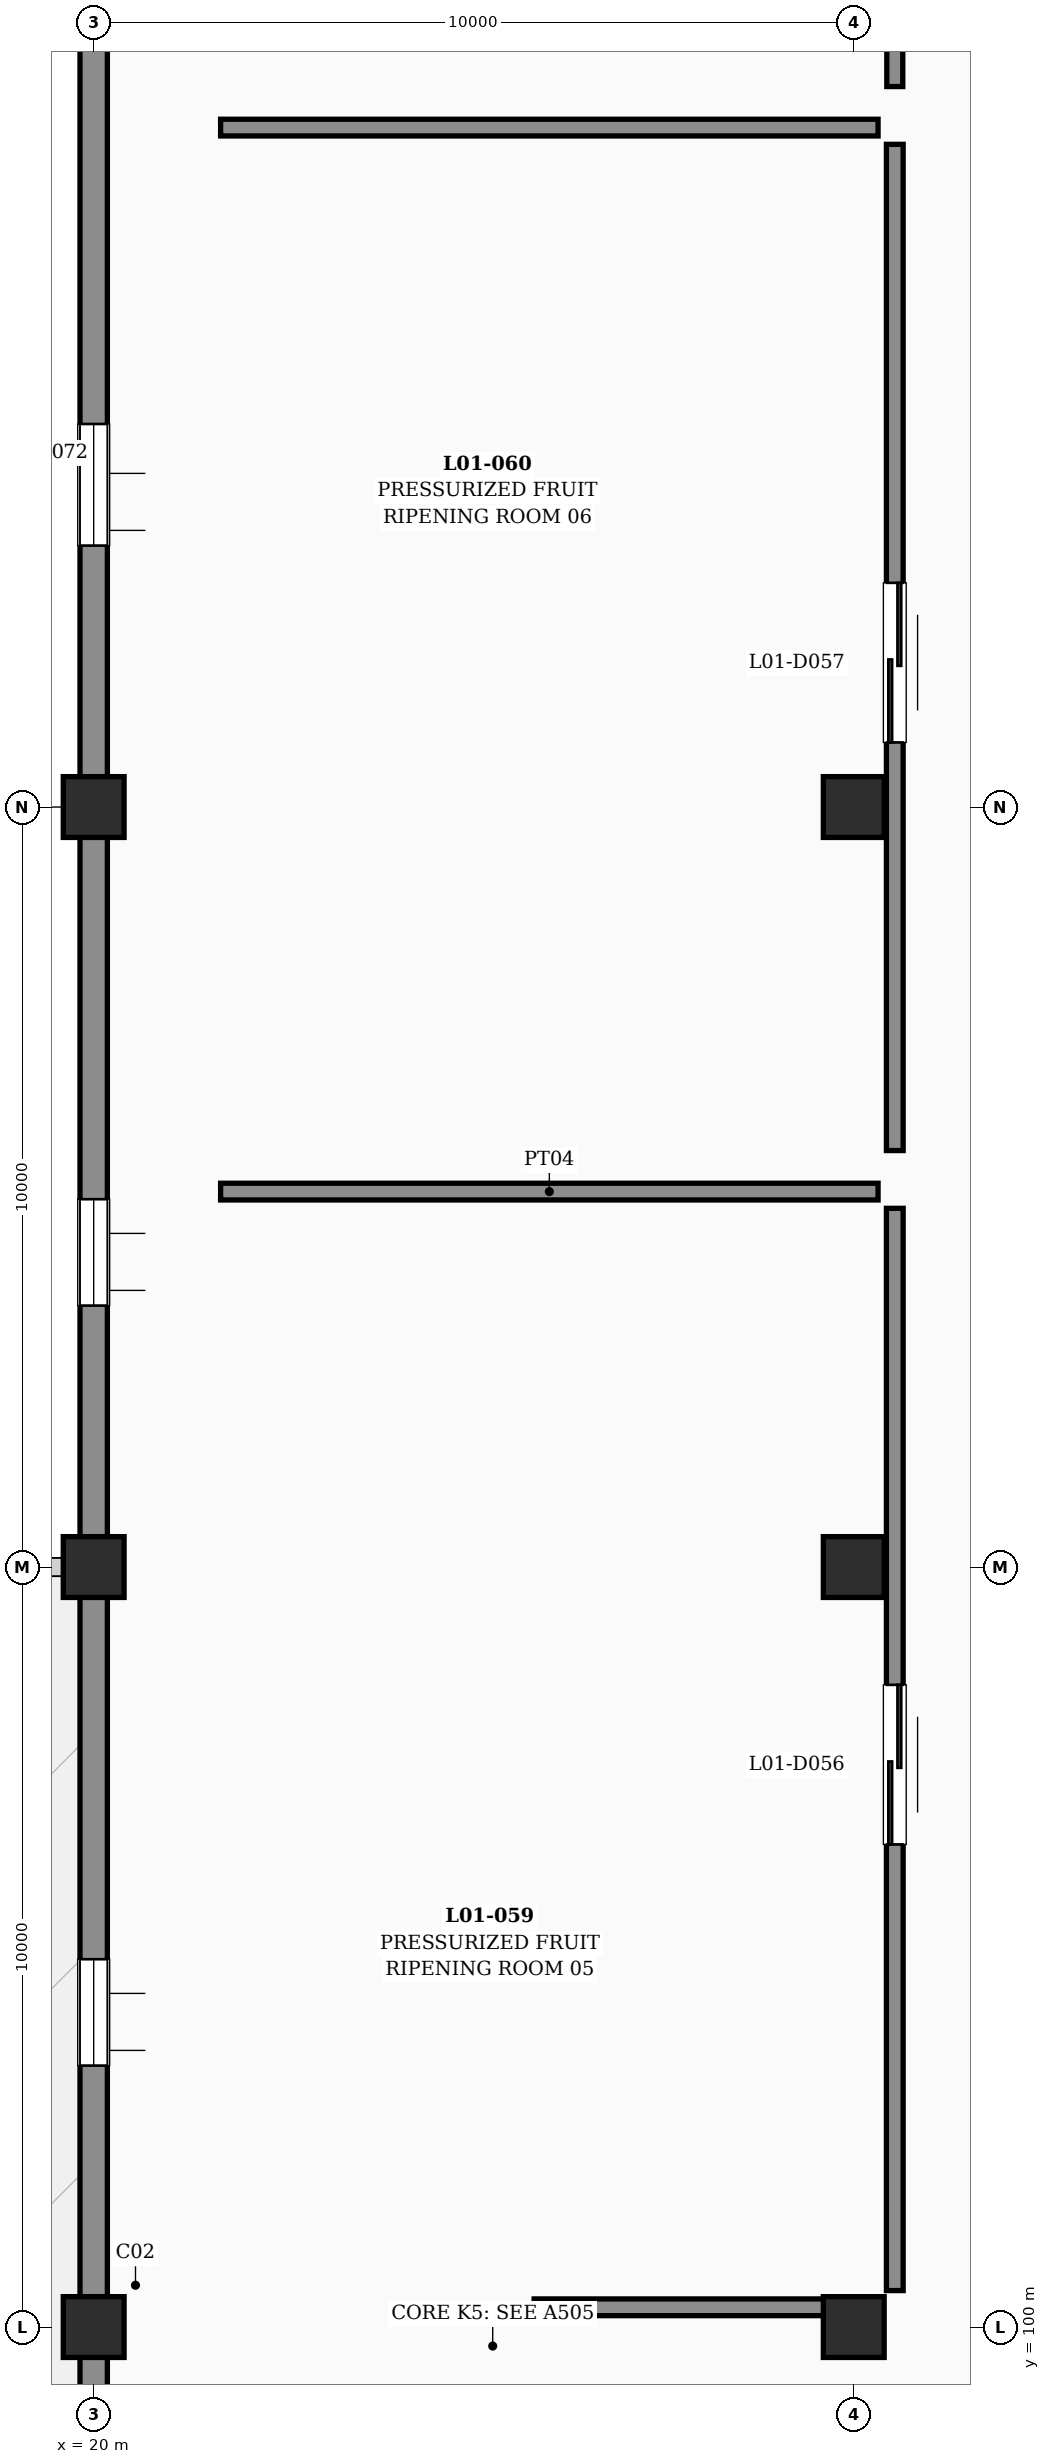
"""IFC4 building model, lengths in metres.
Left out: names, types, materials, properties, quantities, classifications, styles, units other than length and angle.
Written with IfcOpenShell. Run it as: python <this file> out.ifc"""

import sys

from ifc_helpers import new_model, si_unit, direction, frame, frame_2d, origin, origin_2d, place, context, subcontext, project, spatial, rectangle, extrude, element, fill, save


model = new_model("IFC4")
c1 = context("Model", 3, precision=1e-05, world=origin(), true_north=direction((0.0, 1.0)))
c2 = subcontext(c1, "Body", "Model", "MODEL_VIEW")
j1 = project(units=[si_unit("LENGTHUNIT", "METRE"), si_unit("PLANEANGLEUNIT", "RADIAN")], contexts=[c1])
p1 = place(None, origin())
s1 = spatial("IfcSite", under=j1, at=p1, CompositionType="ELEMENT")
p2 = place(p1, origin())
s2 = spatial("IfcBuilding", under=s1, at=p2, CompositionType="ELEMENT")
p3 = place(p2, frame((0.0, 0.0, 6.0)))
s3 = spatial("IfcBuildingStorey", under=s2, at=p3, CompositionType="ELEMENT", Elevation=6.0)
for number, where, z_axis, x_axis in (
    (1, (20.0, 100.0, 0.0), (0.0, 0.0, 1.0), (1.0, 0.0, 0.0)),
    (2, (20.0, 110.0, 0.0), (0.0, 0.0, 1.0), (1.0, 0.0, 0.0)),
    (3, (20.0, 120.0, 0.0), (0.0, 0.0, 1.0), (1.0, 0.0, 0.0)),
    (4, (30.0, 100.0, 0.0), (0.0, 0.0, 1.0), (1.0, 0.0, 0.0)),
    (5, (30.0, 110.0, 0.0), (0.0, 0.0, 1.0), (1.0, 0.0, 0.0)),
    (6, (30.0, 120.0, 0.0), (0.0, 0.0, 1.0), (1.0, 0.0, 0.0)),
):
    element("IfcColumn", number, at=place(p3, frame(where, z_axis=z_axis, x_axis=x_axis)), inside=s3, PredefinedType="COLUMN", context=c2, shape_type="SweptSolid", body=[
        extrude(rectangle(XDim=0.8, YDim=0.8, at=origin_2d()), origin(), (0.0, 0.0, 1.0), 4.8),
    ])
p4 = place(p3, frame((10.24, 110.0, 0.0), z_axis=(0.0, 0.0, 1.0), x_axis=(1.0, 0.0, 0.0)))
e7 = element("IfcWall", 7, at=p4, inside=s3, PredefinedType="PARAPET", context=c2, shape_type="SweptSolid", body=[
    extrude(rectangle(XDim=9.52, YDim=0.24, at=frame_2d((4.76, 0.0))), origin(), (0.0, 0.0, 1.0), 1.1),
])
p5 = place(p3, frame((20.0, 90.24, 0.0), z_axis=(0.0, 0.0, 1.0), x_axis=(0.0, 1.0, 0.0)))
e8 = element("IfcWall", 8, at=p5, inside=s3, PredefinedType="SOLIDWALL", context=c2, shape_type="SweptSolid", body=[
    extrude(rectangle(XDim=9.52, YDim=0.36, at=frame_2d((4.76, 0.0))), origin(), (0.0, 0.0, 1.0), 3.61),
])
p6 = place(p5, frame((3.2, 0.0, 1.2)))
e9 = element("IfcOpeningElement", 9, at=p6, cuts=e8, PredefinedType="OPENING", context=c2, shape_type="SweptSolid", body=[
    extrude(rectangle(XDim=1.4, YDim=1.35, at=frame_2d((0.7, 0.675))), frame((0.0, 0.19, 0.0), z_axis=(0.0, -1.0, 0.0), x_axis=(1.0, 0.0, 0.0)), (0.0, 0.0, 1.0), 0.38),
])
p7 = place(p3, frame((20.0, 100.24, 0.0), z_axis=(0.0, 0.0, 1.0), x_axis=(0.0, 1.0, 0.0)))
e10 = element("IfcWall", 10, at=p7, inside=s3, PredefinedType="SOLIDWALL", context=c2, shape_type="SweptSolid", body=[
    extrude(rectangle(XDim=9.52, YDim=0.36, at=frame_2d((4.76, 0.0))), origin(), (0.0, 0.0, 1.0), 3.61),
])
p8 = place(p7, frame((3.2, 0.0, 1.2)))
e11 = element("IfcOpeningElement", 11, at=p8, cuts=e10, PredefinedType="OPENING", context=c2, shape_type="SweptSolid", body=[
    extrude(rectangle(XDim=1.4, YDim=1.35, at=frame_2d((0.7, 0.675))), frame((0.0, 0.19, 0.0), z_axis=(0.0, -1.0, 0.0), x_axis=(1.0, 0.0, 0.0)), (0.0, 0.0, 1.0), 0.38),
])
p9 = place(p3, frame((20.0, 110.24, 0.0), z_axis=(0.0, 0.0, 1.0), x_axis=(0.0, 1.0, 0.0)))
e12 = element("IfcWall", 12, at=p9, inside=s3, PredefinedType="SOLIDWALL", context=c2, shape_type="SweptSolid", body=[
    extrude(rectangle(XDim=9.52, YDim=0.36, at=frame_2d((4.76, 0.0))), origin(), (0.0, 0.0, 1.0), 3.61),
])
p10 = place(p9, frame((3.2, 0.0, 1.2)))
e13 = element("IfcOpeningElement", 13, at=p10, cuts=e12, PredefinedType="OPENING", context=c2, shape_type="SweptSolid", body=[
    extrude(rectangle(XDim=1.4, YDim=1.35, at=frame_2d((0.7, 0.675))), frame((0.0, 0.19, 0.0), z_axis=(0.0, -1.0, 0.0), x_axis=(1.0, 0.0, 0.0)), (0.0, 0.0, 1.0), 0.38),
])
p11 = place(p3, frame((20.0, 120.24, 0.0), z_axis=(0.0, 0.0, 1.0), x_axis=(0.0, 1.0, 0.0)))
e14 = element("IfcWall", 14, at=p11, inside=s3, PredefinedType="SOLIDWALL", context=c2, shape_type="SweptSolid", body=[
    extrude(rectangle(XDim=11.52, YDim=0.36, at=frame_2d((5.76, 0.0))), origin(), (0.0, 0.0, 1.0), 3.61),
])
p12 = place(p11, frame((3.2, 0.0, 1.2)))
e15 = element("IfcOpeningElement", 15, at=p12, cuts=e14, PredefinedType="OPENING", context=c2, shape_type="SweptSolid", body=[
    extrude(rectangle(XDim=1.6, YDim=1.5, at=frame_2d((0.8, 0.75))), frame((0.0, 0.19, 0.0), z_axis=(0.0, -1.0, 0.0), x_axis=(1.0, 0.0, 0.0)), (0.0, 0.0, 1.0), 0.38),
])
p13 = place(p3, frame((21.67, 114.94, 0.0), z_axis=(0.0, 0.0, 1.0), x_axis=(1.0, 0.0, 0.0)))
e16 = element("IfcWall", 16, at=p13, inside=s3, PredefinedType="PARTITIONING", context=c2, shape_type="SweptSolid", body=[
    extrude(rectangle(XDim=8.65, YDim=0.22, at=frame_2d((4.325, 0.0))), origin(), (0.0, 0.0, 1.0), 3.51),
])
p14 = place(p3, frame((30.54, 114.72, 0.0), z_axis=(0.0, 0.0, 1.0), x_axis=(0.0, -1.0, 0.0)))
e17 = element("IfcWall", 17, at=p14, inside=s3, PredefinedType="PARTITIONING", context=c2, shape_type="SweptSolid", body=[
    extrude(rectangle(XDim=14.24, YDim=0.22, at=frame_2d((7.12, 0.0))), origin(), (0.0, 0.0, 1.0), 3.51),
])
p15 = place(p14, frame((6.27, 0.0, 0.0)))
e18 = element("IfcOpeningElement", 18, at=p15, cuts=e17, PredefinedType="OPENING", context=c2, shape_type="SweptSolid", body=[
    extrude(rectangle(XDim=2.1, YDim=2.4, at=frame_2d((1.05, 1.2))), frame((0.0, 0.12, 0.0), z_axis=(0.0, -1.0, 0.0), x_axis=(1.0, 0.0, 0.0)), (0.0, 0.0, 1.0), 0.24),
])
p16 = place(p3, frame((30.32, 100.26, 0.0), z_axis=(0.0, 0.0, 1.0), x_axis=(-1.0, 0.0, 0.0)))
e19 = element("IfcWall", 19, at=p16, inside=s3, PredefinedType="PARTITIONING", context=c2, shape_type="SweptSolid", body=[
    extrude(rectangle(XDim=4.525, YDim=0.22, at=frame_2d((2.263, 0.0))), origin(), (0.0, 0.0, 1.0), 3.51),
])
p17 = place(p3, frame((21.67, 128.94, 0.0), z_axis=(0.0, 0.0, 1.0), x_axis=(1.0, 0.0, 0.0)))
e20 = element("IfcWall", 20, at=p17, inside=s3, PredefinedType="PARTITIONING", context=c2, shape_type="SweptSolid", body=[
    extrude(rectangle(XDim=8.65, YDim=0.22, at=frame_2d((4.325, 0.0))), origin(), (0.0, 0.0, 1.0), 3.51),
])
p18 = place(p3, frame((30.54, 128.72, 0.0), z_axis=(0.0, 0.0, 1.0), x_axis=(0.0, -1.0, 0.0)))
e21 = element("IfcWall", 21, at=p18, inside=s3, PredefinedType="PARTITIONING", context=c2, shape_type="SweptSolid", body=[
    extrude(rectangle(XDim=13.24, YDim=0.22, at=frame_2d((6.62, 0.0))), origin(), (0.0, 0.0, 1.0), 3.51),
])
p19 = place(p18, frame((5.77, 0.0, 0.0)))
e22 = element("IfcOpeningElement", 22, at=p19, cuts=e21, PredefinedType="OPENING", context=c2, shape_type="SweptSolid", body=[
    extrude(rectangle(XDim=2.1, YDim=2.4, at=frame_2d((1.05, 1.2))), frame((0.0, 0.12, 0.0), z_axis=(0.0, -1.0, 0.0), x_axis=(1.0, 0.0, 0.0)), (0.0, 0.0, 1.0), 0.24),
])
p20 = place(p3, frame((30.54, 140.33, 0.0), z_axis=(0.0, 0.0, 1.0), x_axis=(0.0, -1.0, 0.0)))
e23 = element("IfcWall", 23, at=p20, inside=s3, PredefinedType="PARTITIONING", context=c2, shape_type="SweptSolid", body=[
    extrude(rectangle(XDim=10.85, YDim=0.21, at=frame_2d((5.425, 0.0))), origin(), (0.0, 0.0, 1.0), 3.51),
])
p21 = place(p20, frame((4.575, 0.0, 0.0)))
e24 = element("IfcOpeningElement", 24, at=p21, cuts=e23, PredefinedType="OPENING", context=c2, shape_type="SweptSolid", body=[
    extrude(rectangle(XDim=1.65, YDim=2.25, at=frame_2d((0.825, 1.125))), frame((0.0, 0.115, 0.0), z_axis=(0.0, -1.0, 0.0), x_axis=(1.0, 0.0, 0.0)), (0.0, 0.0, 1.0), 0.23),
])
p22 = place(p8, origin())
e25 = element("IfcWindow", 25, at=p22, inside=s3, PartitioningType="SINGLE_PANEL", PredefinedType="WINDOW", context=c2, shape_type="SweptSolid", body=[
    extrude(rectangle(XDim=1.4, YDim=1.35, at=frame_2d((0.7, 0.675))), frame((0.0, 0.03, 0.0), z_axis=(0.0, -1.0, 0.0), x_axis=(1.0, 0.0, 0.0)), (0.0, 0.0, 1.0), 0.06),
])
fill(e11, e25)
p23 = place(p10, origin())
e26 = element("IfcWindow", 26, at=p23, inside=s3, PartitioningType="SINGLE_PANEL", PredefinedType="WINDOW", context=c2, shape_type="SweptSolid", body=[
    extrude(rectangle(XDim=1.4, YDim=1.35, at=frame_2d((0.7, 0.675))), frame((0.0, 0.03, 0.0), z_axis=(0.0, -1.0, 0.0), x_axis=(1.0, 0.0, 0.0)), (0.0, 0.0, 1.0), 0.06),
])
fill(e13, e26)
p24 = place(p12, origin())
e27 = element("IfcWindow", 27, at=p24, inside=s3, PartitioningType="SINGLE_PANEL", PredefinedType="WINDOW", context=c2, shape_type="SweptSolid", body=[
    extrude(rectangle(XDim=1.6, YDim=1.5, at=frame_2d((0.8, 0.75))), frame((0.0, 0.03, 0.0), z_axis=(0.0, -1.0, 0.0), x_axis=(1.0, 0.0, 0.0)), (0.0, 0.0, 1.0), 0.06),
])
fill(e15, e27)
p25 = place(p15, origin())
e28 = element("IfcDoor", 28, at=p25, inside=s3, OperationType="DOUBLE_DOOR_SLIDING", PredefinedType="DOOR", context=c2, shape_type="SweptSolid", body=[
    extrude(rectangle(XDim=2.1, YDim=2.4, at=frame_2d((1.05, 1.2))), frame((0.0, 0.025, 0.0), z_axis=(0.0, -1.0, 0.0), x_axis=(1.0, 0.0, 0.0)), (0.0, 0.0, 1.0), 0.05),
])
fill(e18, e28)
p26 = place(p19, origin())
e29 = element("IfcDoor", 29, at=p26, inside=s3, OperationType="DOUBLE_DOOR_SLIDING", PredefinedType="DOOR", context=c2, shape_type="SweptSolid", body=[
    extrude(rectangle(XDim=2.1, YDim=2.4, at=frame_2d((1.05, 1.2))), frame((0.0, 0.025, 0.0), z_axis=(0.0, -1.0, 0.0), x_axis=(1.0, 0.0, 0.0)), (0.0, 0.0, 1.0), 0.05),
])
fill(e22, e29)
save(model, sys.argv[1])
